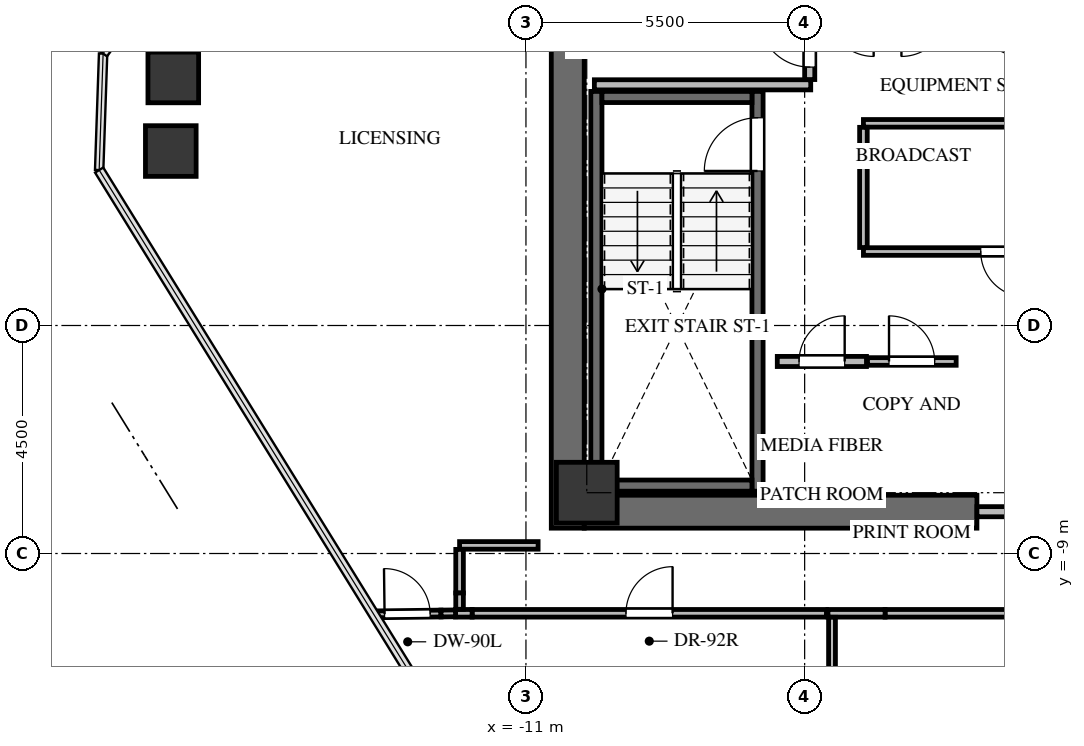
"""IFC4 building model, lengths in metres.
Left out: names, types, materials, properties, quantities, classifications, styles, units other than length and angle.
Written with IfcOpenShell. Run it as: python <this file> out.ifc"""

import sys

from ifc_helpers import new_model, si_unit, direction, frame, frame_2d, origin, origin_2d, place, context, subcontext, project, spatial, rectangle, extrude, source, transform, mapped, element, fill, save


model = new_model("IFC4")
c1 = context("Model", 3, precision=1e-05, world=origin(), true_north=direction((0.0, 1.0)))
c2 = subcontext(c1, "Body", "Model", "MODEL_VIEW")
j1 = project(units=[si_unit("LENGTHUNIT", "METRE"), si_unit("PLANEANGLEUNIT", "RADIAN")], contexts=[c1])
p1 = place(None, origin())
s1 = spatial("IfcSite", under=j1, at=p1, CompositionType="ELEMENT")
p2 = place(p1, origin())
s2 = spatial("IfcBuilding", under=s1, at=p2, CompositionType="ELEMENT")
p3 = place(p2, frame((0.0, 0.0, 206.2)))
s3 = spatial("IfcBuildingStorey", under=s2, at=p3, CompositionType="ELEMENT", Elevation=206.2)
p4 = place(p3, frame((-10.175, -8.5, 0.0), z_axis=(0.0, 0.0, 1.0), x_axis=(0.0, 1.0, 0.0)))
e1 = element("IfcWall", 1, at=p4, inside=s3, PredefinedType="SHEAR", context=c2, shape_type="SweptSolid", body=[
    extrude(rectangle(XDim=17.0, YDim=0.65, at=frame_2d((8.5, 0.0))), origin(), (0.0, 0.0, 1.0), 3.0),
])
p5 = place(p3, frame((-9.85, -8.175, 0.0), z_axis=(0.0, 0.0, 1.0), x_axis=(1.0, 0.0, 0.0)))
e2 = element("IfcWall", 2, at=p5, inside=s3, PredefinedType="SHEAR", context=c2, shape_type="SweptSolid", body=[
    extrude(rectangle(XDim=7.75, YDim=0.65, at=frame_2d((3.875, 0.0))), origin(), (0.0, 0.0, 1.0), 3.0),
])
p6 = place(p3, frame((-6.43, -7.77, -0.24), z_axis=(0.0, 0.0, 1.0), x_axis=(0.0, 1.0, 0.0)))
e3 = element("IfcWall", 3, at=p6, inside=s3, PredefinedType="SHEAR", context=c2, shape_type="SweptSolid", body=[
    extrude(rectangle(XDim=7.89, YDim=0.22, at=frame_2d((3.945, 0.0))), origin(), (0.0, 0.0, 1.0), 3.0),
])
p7 = place(p6, frame((6.32, 0.0, 0.0)))
e4 = element("IfcOpeningElement", 4, at=p7, cuts=e3, PredefinedType="OPENING", context=c2, shape_type="SweptSolid", body=[
    extrude(rectangle(XDim=1.05, YDim=2.15, at=frame_2d((0.525, 1.075))), frame((0.0, 0.12, 0.0), z_axis=(0.0, -1.0, 0.0), x_axis=(1.0, 0.0, 0.0)), (0.0, 0.0, 1.0), 0.24),
])
p8 = place(p3, frame((-9.61, 0.12, -0.24), z_axis=(0.0, 0.0, 1.0), x_axis=(0.0, -1.0, 0.0)))
e5 = element("IfcWall", 5, at=p8, inside=s3, PredefinedType="SHEAR", context=c2, shape_type="SweptSolid", body=[
    extrude(rectangle(XDim=7.89, YDim=0.22, at=frame_2d((3.945, 0.0))), origin(), (0.0, 0.0, 1.0), 3.0),
])
for number, where, z_axis, x_axis in (
    (6, (-9.5, -7.66, -0.24), (0.0, 0.0, 1.0), (1.0, 0.0, 0.0)),
    (7, (-6.54, 0.01, -0.24), (0.0, 0.0, 1.0), (-1.0, 0.0, 0.0)),
):
    element("IfcWall", number, at=place(p3, frame(where, z_axis=z_axis, x_axis=x_axis)), inside=s3, PredefinedType="SHEAR", context=c2, shape_type="SweptSolid", body=[
        extrude(rectangle(XDim=2.96, YDim=0.22, at=frame_2d((1.48, 0.0))), origin(), (0.0, 0.0, 1.0), 3.0),
    ])
m1 = source(origin(), c2, "Body", "SweptSolid", [
    extrude(rectangle(XDim=1.2, YDim=1.2, at=origin_2d()), origin(), (0.0, 0.0, 1.0), 3.0),
])
p9 = place(p3, frame((-9.8, -7.8, -0.24), z_axis=(0.0, 0.0, 1.0), x_axis=(1.0, 0.0, 0.0)))
e8 = element("IfcColumn", 8, at=p9, inside=s3, PredefinedType="COLUMN", context=c2, shape_type="MappedRepresentation", body=[
    mapped(m1, transform((0.0, 0.0, 0.0), x_axis=(1.0, 0.0, 0.0), y_axis=(0.0, 1.0, 0.0), z_axis=(0.0, 0.0, 1.0), scale=1.0)),
])
m2 = source(origin(), c2, "Body", "SweptSolid", [
    extrude(rectangle(XDim=1.0, YDim=1.0, at=origin_2d()), origin(), (0.0, 0.0, 1.0), 3.0),
])
for number, where, z_axis, x_axis in (
    (9, (-18.009, -1.057, -0.24), (0.0, 0.0, 1.0), (1.0, 0.0, 0.0)),
    (10, (-17.96, 0.396, -0.24), (0.0, 0.0, 1.0), (1.0, 0.0, 0.0)),
):
    element("IfcColumn", number, at=place(p3, frame(where, z_axis=z_axis, x_axis=x_axis)), inside=s3, PredefinedType="COLUMN", context=c2, shape_type="MappedRepresentation", body=[
        mapped(m2, transform((0.0, 0.0, 0.0), x_axis=(1.0, 0.0, 0.0), y_axis=(0.0, 1.0, 0.0), z_axis=(0.0, 0.0, 1.0), scale=1.0)),
    ])
p10 = place(p3, frame((-2.1, -8.175, 0.0), z_axis=(0.0, 0.0, 1.0), x_axis=(1.0, 0.0, 0.0)))
e11 = element("IfcWall", 11, at=p10, inside=s3, PredefinedType="SOLIDWALL", context=c2, shape_type="SweptSolid", body=[
    extrude(rectangle(XDim=4.2, YDim=0.2, at=frame_2d((2.1, 0.0))), origin(), (0.0, 0.0, 1.0), 2.745),
])
p11 = place(p10, frame((1.2, 0.0, 0.0)))
e12 = element("IfcOpeningElement", 12, at=p11, cuts=e11, PredefinedType="OPENING", context=c2, shape_type="SweptSolid", body=[
    extrude(rectangle(XDim=1.8, YDim=2.15, at=frame_2d((0.9, 1.075))), frame((0.0, 0.11, 0.0), z_axis=(0.0, -1.0, 0.0), x_axis=(1.0, 0.0, 0.0)), (0.0, 0.0, 1.0), 0.22),
])
p12 = place(p3, frame((-9.65, 0.25, 0.0), z_axis=(0.0, 0.0, 1.0), x_axis=(1.0, 0.0, 0.0)))
e13 = element("IfcWall", 13, at=p12, inside=s3, PredefinedType="SOLIDWALL", context=c2, shape_type="SweptSolid", body=[
    extrude(rectangle(XDim=4.27, YDim=0.2, at=frame_2d((2.135, 0.0))), origin(), (0.0, 0.0, 1.0), 2.745),
])
p13 = place(p3, frame((-5.4, 0.354, 0.0), z_axis=(0.0, 0.0, 1.0), x_axis=(0.0, 1.0, 0.0)))
e14 = element("IfcWall", 14, at=p13, inside=s3, PredefinedType="SOLIDWALL", context=c2, shape_type="SweptSolid", body=[
    extrude(rectangle(XDim=4.026, YDim=0.2, at=frame_2d((2.013, 0.0))), origin(), (0.0, 0.0, 1.0), 2.745),
])
p14 = place(p13, frame((0.246, 0.0, 0.0)))
e15 = element("IfcOpeningElement", 15, at=p14, cuts=e14, PredefinedType="OPENING", context=c2, shape_type="SweptSolid", body=[
    extrude(rectangle(XDim=1.0, YDim=2.15, at=frame_2d((0.5, 1.075))), frame((0.0, 0.11, 0.0), z_axis=(0.0, -1.0, 0.0), x_axis=(1.0, 0.0, 0.0)), (0.0, 0.0, 1.0), 0.22),
])
p15 = place(p3, frame((-6.04, -5.21, 0.0), z_axis=(0.0, 0.0, 1.0), x_axis=(1.0, 0.0, 0.0)))
e16 = element("IfcWall", 16, at=p15, inside=s3, PredefinedType="SOLIDWALL", context=c2, shape_type="SweptSolid", body=[
    extrude(rectangle(XDim=1.76, YDim=0.2, at=frame_2d((0.88, 0.0))), origin(), (0.0, 0.0, 1.0), 2.745),
])
p16 = place(p15, frame((0.43, 0.0, 0.0)))
e17 = element("IfcOpeningElement", 17, at=p16, cuts=e16, PredefinedType="OPENING", context=c2, shape_type="SweptSolid", body=[
    extrude(rectangle(XDim=0.9, YDim=2.05, at=frame_2d((0.45, 1.025))), frame((0.0, 0.11, 0.0), z_axis=(0.0, -1.0, 0.0), x_axis=(1.0, 0.0, 0.0)), (0.0, 0.0, 1.0), 0.22),
])
p17 = place(p3, frame((-4.26, -5.21, 0.0), z_axis=(0.0, 0.0, 1.0), x_axis=(1.0, 0.0, 0.0)))
e18 = element("IfcWall", 18, at=p17, inside=s3, PredefinedType="PARTITIONING", context=c2, shape_type="SweptSolid", body=[
    extrude(rectangle(XDim=1.75, YDim=0.15, at=frame_2d((0.875, 0.0))), origin(), (0.0, 0.0, 1.0), 2.745),
])
p18 = place(p17, frame((0.425, 0.0, 0.0)))
e19 = element("IfcOpeningElement", 19, at=p18, cuts=e18, PredefinedType="OPENING", context=c2, shape_type="SweptSolid", body=[
    extrude(rectangle(XDim=0.9, YDim=2.05, at=frame_2d((0.45, 1.025))), frame((0.0, 0.085, 0.0), z_axis=(0.0, -1.0, 0.0), x_axis=(1.0, 0.0, 0.0)), (0.0, 0.0, 1.0), 0.17),
])
p19 = place(p3, frame((1.19, -3.04, 0.0), z_axis=(0.0, 0.0, 1.0), x_axis=(-1.0, 0.0, 0.0)))
e20 = element("IfcWall", 20, at=p19, inside=s3, PredefinedType="PARTITIONING", context=c2, shape_type="SweptSolid", body=[
    extrude(rectangle(XDim=5.53, YDim=0.15, at=frame_2d((2.765, 0.0))), origin(), (0.0, 0.0, 1.0), 2.745),
])
p20 = place(p19, frame((2.315, 0.0, 0.0)))
e21 = element("IfcOpeningElement", 21, at=p20, cuts=e20, PredefinedType="OPENING", context=c2, shape_type="SweptSolid", body=[
    extrude(rectangle(XDim=0.9, YDim=2.05, at=frame_2d((0.45, 1.025))), frame((0.0, 0.085, 0.0), z_axis=(0.0, -1.0, 0.0), x_axis=(1.0, 0.0, 0.0)), (0.0, 0.0, 1.0), 0.17),
])
p21 = place(p3, frame((-4.34, -0.51, 0.0), z_axis=(0.0, 0.0, 1.0), x_axis=(1.0, 0.0, 0.0)))
e22 = element("IfcWall", 22, at=p21, inside=s3, PredefinedType="PARTITIONING", context=c2, shape_type="SweptSolid", body=[
    extrude(rectangle(XDim=5.53, YDim=0.15, at=frame_2d((2.765, 0.0))), origin(), (0.0, 0.0, 1.0), 2.745),
])
p22 = place(p3, frame((-4.34, -2.961, 0.0), z_axis=(0.0, 0.0, 1.0), x_axis=(0.0, 1.0, 0.0)))
e23 = element("IfcWall", 23, at=p22, inside=s3, PredefinedType="PARTITIONING", context=c2, shape_type="SweptSolid", body=[
    extrude(rectangle(XDim=2.372, YDim=0.15, at=frame_2d((1.186, 0.0))), origin(), (0.0, 0.0, 1.0), 2.745),
])
p23 = place(p3, frame((-12.062, -10.18, 0.0), z_axis=(0.0, 0.0, 1.0), x_axis=(1.0, 0.0, 0.0)))
e24 = element("IfcWall", 24, at=p23, inside=s3, PredefinedType="PARTITIONING", context=c2, shape_type="SweptSolid", body=[
    extrude(rectangle(XDim=6.992, YDim=0.15, at=frame_2d((3.496, 0.0))), origin(), (0.0, 0.0, 1.0), 2.745),
])
p24 = place(p23, frame((3.036, 0.0, 0.0)))
e25 = element("IfcOpeningElement", 25, at=p24, cuts=e24, PredefinedType="OPENING", context=c2, shape_type="SweptSolid", body=[
    extrude(rectangle(XDim=0.92, YDim=2.1, at=frame_2d((0.46, 1.05))), frame((0.0, 0.085, 0.0), z_axis=(0.0, -1.0, 0.0), x_axis=(1.0, 0.0, 0.0)), (0.0, 0.0, 1.0), 0.17),
])
p25 = place(p3, frame((-12.39, -10.18, 0.0), z_axis=(0.0, 0.0, 1.0), x_axis=(1.0, 0.0, 0.0)))
e26 = element("IfcWall", 26, at=p25, inside=s3, PredefinedType="PARTITIONING", context=c2, shape_type="SweptSolid", body=[
    extrude(rectangle(XDim=0.327, YDim=0.15, at=frame_2d((0.164, 0.0))), origin(), (0.0, 0.0, 1.0), 2.099),
])
p26 = place(p3, frame((-3.913, -10.18, 0.0), z_axis=(0.0, 0.0, 1.0), x_axis=(1.0, 0.0, 0.0)))
e27 = element("IfcWall", 27, at=p26, inside=s3, PredefinedType="PARTITIONING", context=c2, shape_type="SweptSolid", body=[
    extrude(rectangle(XDim=2.824, YDim=0.15, at=frame_2d((1.412, 0.0))), origin(), (0.0, 0.0, 1.0), 2.745),
])
p27 = place(p3, frame((-5.04, -10.18, 0.0), z_axis=(0.0, 0.0, 1.0), x_axis=(1.0, 0.0, 0.0)))
e28 = element("IfcWall", 28, at=p27, inside=s3, PredefinedType="PARTITIONING", context=c2, shape_type="SweptSolid", body=[
    extrude(rectangle(XDim=1.127, YDim=0.15, at=frame_2d((0.563, 0.0))), origin(), (0.0, 0.0, 1.0), 1.942),
])
p28 = place(p3, frame((-10.76, -8.84, 0.0), z_axis=(0.0, 0.0, 1.0), x_axis=(-1.0, 0.0, 0.0)))
e29 = element("IfcWall", 29, at=p28, inside=s3, PredefinedType="PARTITIONING", context=c2, shape_type="SweptSolid", body=[
    extrude(rectangle(XDim=1.55, YDim=0.15, at=frame_2d((0.775, 0.0))), origin(), (0.0, 0.0, 1.0), 2.745),
])
p29 = place(p3, frame((-12.31, -8.919, 0.0), z_axis=(0.0, 0.0, 1.0), x_axis=(0.0, -1.0, 0.0)))
e30 = element("IfcWall", 30, at=p29, inside=s3, PredefinedType="PARTITIONING", context=c2, shape_type="SweptSolid", body=[
    extrude(rectangle(XDim=0.86, YDim=0.15, at=frame_2d((0.43, 0.0))), origin(), (0.0, 0.0, 1.0), 2.099),
])
p30 = place(p3, frame((-12.31, -9.779, 0.0), z_axis=(0.0, 0.0, 1.0), x_axis=(0.0, -1.0, 0.0)))
e31 = element("IfcWall", 31, at=p30, inside=s3, PredefinedType="PARTITIONING", context=c2, shape_type="SweptSolid", body=[
    extrude(rectangle(XDim=0.322, YDim=0.15, at=frame_2d((0.161, 0.0))), origin(), (0.0, 0.0, 1.0), 2.099),
])
p31 = place(p3, frame((-4.96, -10.259, 0.0), z_axis=(0.0, 0.0, 1.0), x_axis=(0.0, -1.0, 0.0)))
e32 = element("IfcWall", 32, at=p31, inside=s3, PredefinedType="PARTITIONING", context=c2, shape_type="SweptSolid", body=[
    extrude(rectangle(XDim=1.94, YDim=0.135, at=frame_2d((0.97, 0.0))), origin(), (0.0, 0.0, 1.0), 1.942),
])
p32 = place(p3, frame((-14.004, -10.201, 0.0), z_axis=(0.0, 0.0, 1.0), x_axis=(0.999924024946, 0.012326570317, 0.0)))
e33 = element("IfcWall", 33, at=p32, inside=s3, PredefinedType="PARTITIONING", context=c2, shape_type="SweptSolid", body=[
    extrude(rectangle(XDim=1.327, YDim=0.135, at=frame_2d((0.664, 0.0))), origin(), (0.0, 0.0, 1.0), 2.745),
])
p33 = place(p32, frame((0.214, 0.0, 0.0)))
e34 = element("IfcOpeningElement", 34, at=p33, cuts=e33, PredefinedType="OPENING", context=c2, shape_type="SweptSolid", body=[
    extrude(rectangle(XDim=0.9, YDim=2.05, at=frame_2d((0.45, 1.025))), frame((0.0, 0.078, 0.0), z_axis=(0.0, -1.0, 0.0), x_axis=(1.0, 0.0, 0.0)), (0.0, 0.0, 1.0), 0.155),
])
p34 = place(p3, frame((-12.677, -10.185, 0.0), z_axis=(0.0, 0.0, 1.0), x_axis=(0.99991866361, 0.012754064587, 0.0)))
e35 = element("IfcWall", 35, at=p34, inside=s3, PredefinedType="PARTITIONING", context=c2, shape_type="SweptSolid", body=[
    extrude(rectangle(XDim=0.287, YDim=0.135, at=frame_2d((0.144, 0.0))), origin(), (0.0, 0.0, 1.0), 2.099),
])
m3 = source(origin(), c2, "Body", "SweptSolid", [
    extrude(rectangle(XDim=1.05, YDim=2.15, at=frame_2d((0.525, 1.075))), frame((0.0, 0.025, 0.0), z_axis=(0.0, -1.0, 0.0), x_axis=(1.0, 0.0, 0.0)), (0.0, 0.0, 1.0), 0.05),
])
p35 = place(p7, origin())
e36 = element("IfcDoor", 36, at=p35, inside=s3, OperationType="SINGLE_SWING_LEFT", PredefinedType="DOOR", context=c2, shape_type="MappedRepresentation", body=[
    mapped(m3, transform((0.0, 0.0, 0.0), x_axis=(1.0, 0.0, 0.0), y_axis=(0.0, 1.0, 0.0), z_axis=(0.0, 0.0, 1.0), scale=1.0)),
])
fill(e4, e36)
m4 = source(origin(), c2, "Body", "SweptSolid", [
    extrude(rectangle(XDim=1.0, YDim=2.15, at=frame_2d((0.5, 1.075))), frame((0.0, 0.025, 0.0), z_axis=(0.0, -1.0, 0.0), x_axis=(1.0, 0.0, 0.0)), (0.0, 0.0, 1.0), 0.05),
])
p36 = place(p14, origin())
e37 = element("IfcDoor", 37, at=p36, inside=s3, OperationType="SINGLE_SWING_RIGHT", PredefinedType="DOOR", context=c2, shape_type="MappedRepresentation", body=[
    mapped(m4, transform((0.0, 0.0, 0.0), x_axis=(1.0, 0.0, 0.0), y_axis=(0.0, 1.0, 0.0), z_axis=(0.0, 0.0, 1.0), scale=1.0)),
])
fill(e15, e37)
m5 = source(origin(), c2, "Body", "SweptSolid", [
    extrude(rectangle(XDim=0.9, YDim=2.05, at=frame_2d((0.45, 1.025))), frame((0.0, 0.025, 0.0), z_axis=(0.0, -1.0, 0.0), x_axis=(1.0, 0.0, 0.0)), (0.0, 0.0, 1.0), 0.05),
])
p37 = place(p16, origin())
e38 = element("IfcDoor", 38, at=p37, inside=s3, OperationType="SINGLE_SWING_RIGHT", PredefinedType="DOOR", context=c2, shape_type="MappedRepresentation", body=[
    mapped(m5, transform((0.0, 0.0, 0.0), x_axis=(1.0, 0.0, 0.0), y_axis=(0.0, 1.0, 0.0), z_axis=(0.0, 0.0, 1.0), scale=1.0)),
])
fill(e17, e38)
m6 = source(origin(), c2, "Body", "SweptSolid", [
    extrude(rectangle(XDim=0.9, YDim=2.05, at=frame_2d((0.45, 1.025))), frame((0.0, 0.025, 0.0), z_axis=(0.0, -1.0, 0.0), x_axis=(1.0, 0.0, 0.0)), (0.0, 0.0, 1.0), 0.05),
])
p38 = place(p18, origin())
e39 = element("IfcDoor", 39, at=p38, inside=s3, OperationType="SINGLE_SWING_LEFT", PredefinedType="DOOR", context=c2, shape_type="MappedRepresentation", body=[
    mapped(m6, transform((0.0, 0.0, 0.0), x_axis=(1.0, 0.0, 0.0), y_axis=(0.0, 1.0, 0.0), z_axis=(0.0, 0.0, 1.0), scale=1.0)),
])
fill(e19, e39)
p39 = place(p20, origin())
e40 = element("IfcDoor", 40, at=p39, inside=s3, OperationType="SINGLE_SWING_LEFT", PredefinedType="DOOR", context=c2, shape_type="MappedRepresentation", body=[
    mapped(m6, transform((0.0, 0.0, 0.0), x_axis=(1.0, 0.0, 0.0), y_axis=(0.0, 1.0, 0.0), z_axis=(0.0, 0.0, 1.0), scale=1.0)),
])
fill(e21, e40)
m7 = source(origin(), c2, "Body", "SweptSolid", [
    extrude(rectangle(XDim=0.92, YDim=2.1, at=frame_2d((0.46, 1.05))), frame((0.0, 0.025, 0.0), z_axis=(0.0, -1.0, 0.0), x_axis=(1.0, 0.0, 0.0)), (0.0, 0.0, 1.0), 0.05),
])
p40 = place(p24, origin())
e41 = element("IfcDoor", 41, at=p40, inside=s3, OperationType="SINGLE_SWING_RIGHT", PredefinedType="DOOR", context=c2, shape_type="MappedRepresentation", body=[
    mapped(m7, transform((0.0, 0.0, 0.0), x_axis=(1.0, 0.0, 0.0), y_axis=(0.0, 1.0, 0.0), z_axis=(0.0, 0.0, 1.0), scale=1.0)),
])
fill(e25, e41)
m8 = source(origin(), c2, "Body", "SweptSolid", [
    extrude(rectangle(XDim=0.9, YDim=2.05, at=frame_2d((0.45, 1.025))), frame((0.0, 0.025, 0.0), z_axis=(0.0, -1.0, 0.0), x_axis=(1.0, 0.0, 0.0)), (0.0, 0.0, 1.0), 0.05),
])
p41 = place(p33, origin())
e42 = element("IfcDoor", 42, at=p41, inside=s3, OperationType="SINGLE_SWING_LEFT", PredefinedType="DOOR", context=c2, shape_type="MappedRepresentation", body=[
    mapped(m8, transform((0.0, 0.0, 0.0), x_axis=(1.0, 0.0, 0.0), y_axis=(0.0, 1.0, 0.0), z_axis=(0.0, 0.0, 1.0), scale=1.0)),
])
fill(e34, e42)
save(model, sys.argv[1])
